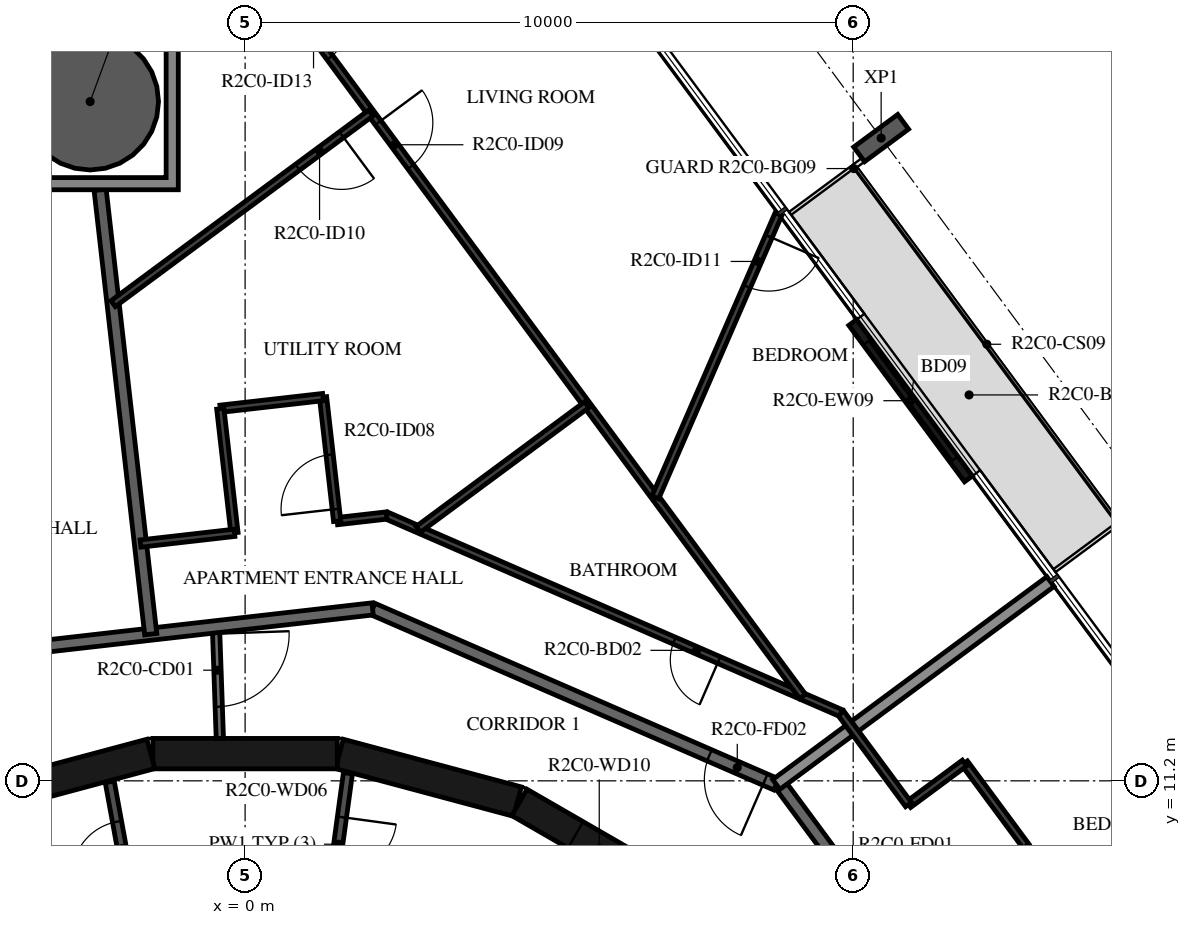
"""IFC4 building model, lengths in metres.
Left out: names, types, materials, properties, quantities, classifications, styles, units other than length and angle.
Written with IfcOpenShell. Run it as: python <this file> out.ifc"""

import sys

from ifc_helpers import new_model, si_unit, direction, frame, frame_2d, origin, origin_2d, place, context, subcontext, project, spatial, polyline, rectangle, hollow_circle, i_section, outline, extrude, element, fill, save


model = new_model("IFC4")
c1 = context("Model", 3, precision=1e-05, world=origin(), true_north=direction((0.0, 1.0)))
c2 = subcontext(c1, "Body", "Model", "MODEL_VIEW")
j1 = project(units=[si_unit("LENGTHUNIT", "METRE"), si_unit("PLANEANGLEUNIT", "RADIAN")], contexts=[c1])
p1 = place(None, origin())
s1 = spatial("IfcSite", under=j1, at=p1, CompositionType="ELEMENT")
p2 = place(p1, origin())
s2 = spatial("IfcBuilding", under=s1, at=p2, CompositionType="ELEMENT")
p3 = place(p2, frame((0.0, 0.0, 97.7)))
s3 = spatial("IfcBuildingStorey", under=s2, at=p3, CompositionType="ELEMENT", Elevation=97.7)
p4 = place(p3, frame((-2.549, 22.37, -0.38), z_axis=(0.0, 0.0, 1.0), x_axis=(1.0, 0.0, 0.0)))
e1 = element("IfcColumn", 1, at=p4, inside=s3, PredefinedType="COLUMN", context=c2, shape_type="SweptSolid", body=[
    extrude(hollow_circle(Radius=1.125, WallThickness=0.055, at=origin_2d()), origin(), (0.0, 0.0, 1.0), 3.5),
])
p5 = place(p3, frame((10.46, 21.77, -0.38), z_axis=(0.0, 0.0, 1.0), x_axis=(0.594822857897, -0.803856807972, 0.0)))
e2 = element("IfcColumn", 2, at=p5, inside=s3, PredefinedType="COLUMN", context=c2, shape_type="SweptSolid", body=[
    extrude(i_section(OverallWidth=0.3, OverallDepth=0.9, WebThickness=0.019, FlangeThickness=0.035, FilletRadius=0.03, at=origin_2d()), origin(), (0.0, 0.0, 1.0), 3.5),
])
p6 = place(p3, frame((11.895, 16.165, 0.0), z_axis=(0.0, 0.0, 1.0), x_axis=(-0.594774973163, 0.803892238611, 0.0)))
e3 = element("IfcWall", 3, at=p6, inside=s3, PredefinedType="STANDARD", context=c2, shape_type="SweptSolid", body=[
    extrude(rectangle(XDim=3.2, YDim=0.16, at=frame_2d((1.6, 0.0))), origin(), (0.0, 0.0, 1.0), 3.12),
])
p7 = place(p6, frame((0.4, 0.0, 0.0)))
e4 = element("IfcOpeningElement", 4, at=p7, cuts=e3, PredefinedType="OPENING", context=c2, shape_type="SweptSolid", body=[
    extrude(rectangle(XDim=2.4, YDim=2.4, at=frame_2d((1.2, 1.2))), frame((0.0, 0.09, 0.0), z_axis=(0.0, -1.0, 0.0), x_axis=(1.0, 0.0, 0.0)), (0.0, 0.0, 1.0), 0.18),
])
p8 = place(p3, frame((7.137, 9.329, 0.0), z_axis=(0.0, 0.0, 1.0), x_axis=(-0.865975092491, 0.500087131594, 0.0)))
e5 = element("IfcWall", 5, at=p8, inside=s3, PredefinedType="SHEAR", context=c2, shape_type="SweptSolid", body=[
    extrude(rectangle(XDim=3.033, YDim=0.5, at=frame_2d((1.516, 0.0))), origin(), (0.0, 0.0, 1.0), 3.12),
])
p9 = place(p8, frame((1.066, 0.0, 0.0)))
e6 = element("IfcOpeningElement", 6, at=p9, cuts=e5, PredefinedType="OPENING", context=c2, shape_type="SweptSolid", body=[
    extrude(rectangle(XDim=0.9, YDim=2.1, at=frame_2d((0.45, 1.05))), frame((0.0, 0.26, 0.0), z_axis=(0.0, -1.0, 0.0), x_axis=(1.0, 0.0, 0.0)), (0.0, 0.0, 1.0), 0.52),
])
for number, where, z_axis, x_axis in (
    (7, (4.479, 10.858, 0.0), (0.0, 0.0, 1.0), (-0.966, 0.259, 0.0)),
    (8, (1.516, 11.647, 0.0), (0.0, 0.0, 1.0), (-1.0, 0.0, 0.0)),
    (9, (-1.55, 11.643, 0.0), (0.0, 0.0, 1.0), (-0.966, -0.259, 0.0)),
):
    element("IfcWall", number, at=place(p3, frame(where, z_axis=z_axis, x_axis=x_axis)), inside=s3, PredefinedType="SHEAR", context=c2, shape_type="SweptSolid", body=[
        extrude(rectangle(XDim=3.033, YDim=0.5, at=frame_2d((1.516, 0.0))), origin(), (0.0, 0.0, 1.0), 3.12),
    ])
p10 = place(p3, frame((1.691, 11.326, 0.0), z_axis=(0.0, 0.0, 1.0), x_axis=(-0.135344253201, -0.990798633994, 0.0)))
e10 = element("IfcWall", 10, at=p10, inside=s3, PredefinedType="PARTITIONING", context=c2, shape_type="SweptSolid", body=[
    extrude(rectangle(XDim=2.358, YDim=0.15, at=frame_2d((1.179, 0.0))), origin(), (0.0, 0.0, 1.0), 3.12),
])
p11 = place(p10, frame((0.729, 0.0, 0.0)))
e11 = element("IfcOpeningElement", 11, at=p11, cuts=e10, PredefinedType="OPENING", context=c2, shape_type="SweptSolid", body=[
    extrude(rectangle(XDim=0.9, YDim=2.1, at=frame_2d((0.45, 1.05))), frame((0.0, 0.085, 0.0), z_axis=(0.0, -1.0, 0.0), x_axis=(1.0, 0.0, 0.0)), (0.0, 0.0, 1.0), 0.17),
])
p12 = place(p3, frame((-1.825, 8.99, 0.0), z_axis=(0.0, 0.0, 1.0), x_axis=(-0.179955206115, 0.983674805915, 0.0)))
e12 = element("IfcWall", 12, at=p12, inside=s3, PredefinedType="PARTITIONING", context=c2, shape_type="SweptSolid", body=[
    extrude(rectangle(XDim=2.229, YDim=0.15, at=frame_2d((1.115, 0.0))), origin(), (0.0, 0.0, 1.0), 3.12),
])
p13 = place(p12, frame((0.665, 0.0, 0.0)))
e13 = element("IfcOpeningElement", 13, at=p13, cuts=e12, PredefinedType="OPENING", context=c2, shape_type="SweptSolid", body=[
    extrude(rectangle(XDim=0.9, YDim=2.1, at=frame_2d((0.45, 1.05))), frame((0.0, 0.085, 0.0), z_axis=(0.0, -1.0, 0.0), x_axis=(1.0, 0.0, 0.0)), (0.0, 0.0, 1.0), 0.17),
])
p14 = place(p3, frame((-0.479, 13.734, 0.0), z_axis=(0.0, 0.0, 1.0), x_axis=(0.034805430832, -0.999394107439, 0.0)))
e14 = element("IfcWall", 14, at=p14, inside=s3, PredefinedType="PARTITIONING", context=c2, shape_type="SweptSolid", body=[
    extrude(rectangle(XDim=1.838, YDim=0.12, at=frame_2d((0.919, 0.0))), origin(), (0.0, 0.0, 1.0), 3.12),
])
p15 = place(p14, frame((0.115, 0.0, 0.0)))
e15 = element("IfcOpeningElement", 15, at=p15, cuts=e14, PredefinedType="OPENING", context=c2, shape_type="SweptSolid", body=[
    extrude(rectangle(XDim=1.2, YDim=2.1, at=frame_2d((0.6, 1.05))), frame((0.0, 0.07, 0.0), z_axis=(0.0, -1.0, 0.0), x_axis=(1.0, 0.0, 0.0)), (0.0, 0.0, 1.0), 0.14),
])
p16 = place(p3, frame((13.196, 5.198, 0.0), z_axis=(0.0, 0.0, 1.0), x_axis=(-0.594805187394, 0.803869883159, 0.0)))
e16 = element("IfcWall", 16, at=p16, inside=s3, PredefinedType="STANDARD", context=c2, shape_type="SweptSolid", body=[
    extrude(rectangle(XDim=7.342, YDim=0.2, at=frame_2d((3.671, 0.0))), origin(), (0.0, 0.0, 1.0), 3.12),
])
p17 = place(p16, frame((4.7, 0.0, 0.0)))
e17 = element("IfcOpeningElement", 17, at=p17, cuts=e16, PredefinedType="OPENING", context=c2, shape_type="SweptSolid", body=[
    extrude(rectangle(XDim=1.0, YDim=2.1, at=frame_2d((0.5, 1.05))), frame((0.0, 0.11, 0.0), z_axis=(0.0, -1.0, 0.0), x_axis=(1.0, 0.0, 0.0)), (0.0, 0.0, 1.0), 0.22),
])
p18 = place(p3, frame((8.736, 11.141, 0.0), z_axis=(0.0, 0.0, 1.0), x_axis=(-0.917051290697, 0.398769269416, 0.0)))
e18 = element("IfcWall", 18, at=p18, inside=s3, PredefinedType="STANDARD", context=c2, shape_type="SweptSolid", body=[
    extrude(rectangle(XDim=7.24, YDim=0.2, at=frame_2d((3.62, 0.0))), origin(), (0.0, 0.0, 1.0), 3.12),
])
p19 = place(p18, frame((0.2, 0.0, 0.0)))
e19 = element("IfcOpeningElement", 19, at=p19, cuts=e18, PredefinedType="OPENING", context=c2, shape_type="SweptSolid", body=[
    extrude(rectangle(XDim=1.0, YDim=2.1, at=frame_2d((0.5, 1.05))), frame((0.0, 0.11, 0.0), z_axis=(0.0, -1.0, 0.0), x_axis=(1.0, 0.0, 0.0)), (0.0, 0.0, 1.0), 0.22),
])
p20 = place(p3, frame((2.096, 14.028, 0.0), z_axis=(0.0, 0.0, 1.0), x_axis=(-0.993569170114, -0.113226782163, 0.0)))
e20 = element("IfcWall", 20, at=p20, inside=s3, PredefinedType="STANDARD", context=c2, shape_type="SweptSolid", body=[
    extrude(rectangle(XDim=7.342, YDim=0.2, at=frame_2d((3.671, 0.0))), origin(), (0.0, 0.0, 1.0), 3.12),
])
p21 = place(p3, frame((13.244, 14.477, 0.0), z_axis=(0.0, 0.0, 1.0), x_axis=(-0.803853971109, -0.594826691677, 0.0)))
e21 = element("IfcWall", 21, at=p21, inside=s3, PredefinedType="STANDARD", context=c2, shape_type="SweptSolid", body=[
    extrude(rectangle(XDim=5.609, YDim=0.2, at=frame_2d((2.804, 0.0))), origin(), (0.0, 0.0, 1.0), 2.73),
])
p22 = place(p3, frame((-2.385, 20.92, 0.0), z_axis=(0.0, 0.0, 1.0), x_axis=(0.113177776247, -0.993574753586, 0.0)))
e22 = element("IfcWall", 22, at=p22, inside=s3, PredefinedType="STANDARD", context=c2, shape_type="SweptSolid", body=[
    extrude(rectangle(XDim=7.356, YDim=0.2, at=frame_2d((3.678, 0.0))), origin(), (0.0, 0.0, 1.0), 3.12),
])
p23 = place(p3, frame((11.921, 9.444, 0.0), z_axis=(0.0, 0.0, 1.0), x_axis=(0.803768532163, 0.594942137274, 0.0)))
e23 = element("IfcWall", 23, at=p23, inside=s3, PredefinedType="PARTITIONING", context=c2, shape_type="SweptSolid", body=[
    extrude(rectangle(XDim=1.146, YDim=0.12, at=frame_2d((0.573, 0.0))), origin(), (0.0, 0.0, 1.0), 3.12),
])
p24 = place(p3, frame((12.842, 10.125, 0.0), z_axis=(0.0, 0.0, 1.0), x_axis=(-0.594770612735, 0.803895464738, 0.0)))
e24 = element("IfcWall", 24, at=p24, inside=s3, PredefinedType="PARTITIONING", context=c2, shape_type="SweptSolid", body=[
    extrude(rectangle(XDim=1.7, YDim=0.12, at=frame_2d((0.85, 0.0))), origin(), (0.0, 0.0, 1.0), 3.12),
])
p25 = place(p3, frame((11.831, 11.492, 0.0), z_axis=(0.0, 0.0, 1.0), x_axis=(-0.803843936653, -0.59484025209, 0.0)))
e25 = element("IfcWall", 25, at=p25, inside=s3, PredefinedType="PARTITIONING", context=c2, shape_type="SweptSolid", body=[
    extrude(rectangle(XDim=1.146, YDim=0.12, at=frame_2d((0.573, 0.0))), origin(), (0.0, 0.0, 1.0), 3.12),
])
p26 = place(p3, frame((10.91, 10.81, 0.0), z_axis=(0.0, 0.0, 1.0), x_axis=(-0.59489693125, 0.803801991282, 0.0)))
e26 = element("IfcWall", 26, at=p26, inside=s3, PredefinedType="PARTITIONING", context=c2, shape_type="SweptSolid", body=[
    extrude(rectangle(XDim=1.872, YDim=0.12, at=frame_2d((0.936, 0.0))), origin(), (0.0, 0.0, 1.0), 3.12),
])
p27 = place(p3, frame((9.796, 12.315, 0.0), z_axis=(0.0, 0.0, 1.0), x_axis=(-0.917059572812, 0.398750222463, 0.0)))
e27 = element("IfcWall", 27, at=p27, inside=s3, PredefinedType="PARTITIONING", context=c2, shape_type="SweptSolid", body=[
    extrude(rectangle(XDim=8.146, YDim=0.12, at=frame_2d((4.073, 0.0))), origin(), (0.0, 0.0, 1.0), 3.12),
])
p28 = place(p27, frame((2.185, 0.0, 0.0)))
e28 = element("IfcOpeningElement", 28, at=p28, cuts=e27, PredefinedType="OPENING", context=c2, shape_type="SweptSolid", body=[
    extrude(rectangle(XDim=0.8, YDim=2.1, at=frame_2d((0.4, 1.05))), frame((0.0, 0.07, 0.0), z_axis=(0.0, -1.0, 0.0), x_axis=(1.0, 0.0, 0.0)), (0.0, 0.0, 1.0), 0.14),
])
p29 = place(p3, frame((2.326, 15.563, 0.0), z_axis=(0.0, 0.0, 1.0), x_axis=(-0.993570169982, -0.113218007944, 0.0)))
e29 = element("IfcWall", 29, at=p29, inside=s3, PredefinedType="PARTITIONING", context=c2, shape_type="SweptSolid", body=[
    extrude(rectangle(XDim=0.817, YDim=0.12, at=frame_2d((0.409, 0.0))), origin(), (0.0, 0.0, 1.0), 3.12),
])
p30 = place(p3, frame((1.514, 15.471, 0.0), z_axis=(0.0, 0.0, 1.0), x_axis=(-0.113301814952, 0.993560616535, 0.0)))
e30 = element("IfcWall", 30, at=p30, inside=s3, PredefinedType="PARTITIONING", context=c2, shape_type="SweptSolid", body=[
    extrude(rectangle(XDim=2.053, YDim=0.12, at=frame_2d((1.027, 0.0))), origin(), (0.0, 0.0, 1.0), 3.12),
])
p31 = place(p30, frame((0.2, 0.0, 0.0)))
e31 = element("IfcOpeningElement", 31, at=p31, cuts=e30, PredefinedType="OPENING", context=c2, shape_type="SweptSolid", body=[
    extrude(rectangle(XDim=0.9, YDim=2.1, at=frame_2d((0.45, 1.05))), frame((0.0, 0.07, 0.0), z_axis=(0.0, -1.0, 0.0), x_axis=(1.0, 0.0, 0.0)), (0.0, 0.0, 1.0), 0.14),
])
p32 = place(p3, frame((1.281, 17.511, 0.0), z_axis=(0.0, 0.0, 1.0), x_axis=(-0.993575191649, -0.113173930474, 0.0)))
e32 = element("IfcWall", 32, at=p32, inside=s3, PredefinedType="PARTITIONING", context=c2, shape_type="SweptSolid", body=[
    extrude(rectangle(XDim=1.7, YDim=0.12, at=frame_2d((0.85, 0.0))), origin(), (0.0, 0.0, 1.0), 3.12),
])
p33 = place(p3, frame((-0.408, 17.319, 0.0), z_axis=(0.0, 0.0, 1.0), x_axis=(0.113184449176, -0.993573993452, 0.0)))
e33 = element("IfcWall", 33, at=p33, inside=s3, PredefinedType="PARTITIONING", context=c2, shape_type="SweptSolid", body=[
    extrude(rectangle(XDim=2.053, YDim=0.12, at=frame_2d((1.027, 0.0))), origin(), (0.0, 0.0, 1.0), 3.12),
])
p34 = place(p3, frame((-0.175, 15.278, 0.0), z_axis=(0.0, 0.0, 1.0), x_axis=(-0.993575604955, -0.113170301923, 0.0)))
e34 = element("IfcWall", 34, at=p34, inside=s3, PredefinedType="PARTITIONING", context=c2, shape_type="SweptSolid", body=[
    extrude(rectangle(XDim=1.555, YDim=0.12, at=frame_2d((0.778, 0.0))), origin(), (0.0, 0.0, 1.0), 3.12),
])
p35 = place(p3, frame((0.498, 24.306, 0.0), z_axis=(0.0, 0.0, 1.0), x_axis=(0.594826122019, -0.803854392639, 0.0)))
e35 = element("IfcWall", 35, at=p35, inside=s3, PredefinedType="PARTITIONING", context=c2, shape_type="SweptSolid", body=[
    extrude(rectangle(XDim=14.576, YDim=0.12, at=frame_2d((7.288, 0.0))), origin(), (0.0, 0.0, 1.0), 3.12),
])
p36 = place(p35, frame((2.841, 0.0, 0.0)))
e36 = element("IfcOpeningElement", 36, at=p36, cuts=e35, PredefinedType="OPENING", context=c2, shape_type="SweptSolid", body=[
    extrude(rectangle(XDim=0.9, YDim=2.1, at=frame_2d((0.45, 1.05))), frame((0.0, 0.07, 0.0), z_axis=(0.0, -1.0, 0.0), x_axis=(1.0, 0.0, 0.0)), (0.0, 0.0, 1.0), 0.14),
])
p37 = place(p35, frame((0.605, 0.0, 0.0)))
e37 = element("IfcOpeningElement", 37, at=p37, cuts=e35, PredefinedType="OPENING", context=c2, shape_type="SweptSolid", body=[
    extrude(rectangle(XDim=0.9, YDim=2.1, at=frame_2d((0.45, 1.05))), frame((0.0, 0.07, 0.0), z_axis=(0.0, -1.0, 0.0), x_axis=(1.0, 0.0, 0.0)), (0.0, 0.0, 1.0), 0.14),
])
p38 = place(p3, frame((8.772, 20.521, 0.0), z_axis=(0.0, 0.0, 1.0), x_axis=(-0.398733139635, -0.917067000473, 0.0)))
e38 = element("IfcWall", 38, at=p38, inside=s3, PredefinedType="PARTITIONING", context=c2, shape_type="SweptSolid", body=[
    extrude(rectangle(XDim=5.081, YDim=0.12, at=frame_2d((2.541, 0.0))), origin(), (0.0, 0.0, 1.0), 3.12),
])
p39 = place(p38, frame((0.4, 0.0, 0.0)))
e39 = element("IfcOpeningElement", 39, at=p39, cuts=e38, PredefinedType="OPENING", context=c2, shape_type="SweptSolid", body=[
    extrude(rectangle(XDim=0.9, YDim=2.1, at=frame_2d((0.45, 1.05))), frame((0.0, 0.07, 0.0), z_axis=(0.0, -1.0, 0.0), x_axis=(1.0, 0.0, 0.0)), (0.0, 0.0, 1.0), 0.14),
])
p40 = place(p3, frame((5.618, 17.386, 0.0), z_axis=(0.0, 0.0, 1.0), x_axis=(-0.803852063114, -0.59482927015, 0.0)))
e40 = element("IfcWall", 40, at=p40, inside=s3, PredefinedType="PARTITIONING", context=c2, shape_type="SweptSolid", body=[
    extrude(rectangle(XDim=3.446, YDim=0.12, at=frame_2d((1.723, 0.0))), origin(), (0.0, 0.0, 1.0), 3.12),
])
p41 = place(p3, frame((2.068, 22.183, 0.0), z_axis=(0.0, 0.0, 1.0), x_axis=(-0.803867138365, -0.594808896921, 0.0)))
e41 = element("IfcWall", 41, at=p41, inside=s3, PredefinedType="PARTITIONING", context=c2, shape_type="SweptSolid", body=[
    extrude(rectangle(XDim=5.273, YDim=0.12, at=frame_2d((2.636, 0.0))), origin(), (0.0, 0.0, 1.0), 3.12),
])
p42 = place(p41, frame((0.6, 0.0, 0.0)))
e42 = element("IfcOpeningElement", 42, at=p42, cuts=e41, PredefinedType="OPENING", context=c2, shape_type="SweptSolid", body=[
    extrude(rectangle(XDim=0.9, YDim=2.1, at=frame_2d((0.45, 1.05))), frame((0.0, 0.07, 0.0), z_axis=(0.0, -1.0, 0.0), x_axis=(1.0, 0.0, 0.0)), (0.0, 0.0, 1.0), 0.14),
])
p43 = place(p3, origin())
e43 = element("IfcWall", 43, at=p43, inside=s3, PredefinedType="STANDARD", context=c2, shape_type="SweptSolid", body=[
    extrude(outline(polyline([(-1.099, 23.82), (-1.099, 20.92), (-3.999, 20.92), (-3.999, 23.82), (-1.099, 23.82)]), holes=[polyline([(-3.799, 21.12), (-1.299, 21.12), (-1.299, 23.62), (-3.799, 23.62), (-3.799, 21.12)])]), origin(), (0.0, 0.0, 1.0), 3.12),
])
p44 = place(p7, origin())
e44 = element("IfcDoor", 44, at=p44, inside=s3, OperationType="DOUBLE_DOOR_SLIDING", PredefinedType="DOOR", context=c2, shape_type="SweptSolid", body=[
    extrude(rectangle(XDim=2.4, YDim=2.4, at=frame_2d((1.2, 1.2))), frame((0.0, 0.025, 0.0), z_axis=(0.0, -1.0, 0.0), x_axis=(1.0, 0.0, 0.0)), (0.0, 0.0, 1.0), 0.05),
])
fill(e4, e44)
p45 = place(p11, origin())
e45 = element("IfcDoor", 45, at=p45, inside=s3, OperationType="SINGLE_SWING_LEFT", PredefinedType="DOOR", context=c2, shape_type="SweptSolid", body=[
    extrude(rectangle(XDim=0.9, YDim=2.1, at=frame_2d((0.45, 1.05))), frame((0.0, 0.025, 0.0), z_axis=(0.0, -1.0, 0.0), x_axis=(1.0, 0.0, 0.0)), (0.0, 0.0, 1.0), 0.05),
])
fill(e11, e45)
p46 = place(p13, origin())
e46 = element("IfcDoor", 46, at=p46, inside=s3, OperationType="SINGLE_SWING_RIGHT", PredefinedType="DOOR", context=c2, shape_type="SweptSolid", body=[
    extrude(rectangle(XDim=0.9, YDim=2.1, at=frame_2d((0.45, 1.05))), frame((0.0, 0.025, 0.0), z_axis=(0.0, -1.0, 0.0), x_axis=(1.0, 0.0, 0.0)), (0.0, 0.0, 1.0), 0.05),
])
fill(e13, e46)
p47 = place(p9, origin())
e47 = element("IfcDoor", 47, at=p47, inside=s3, OperationType="SINGLE_SWING_LEFT", PredefinedType="DOOR", context=c2, shape_type="SweptSolid", body=[
    extrude(rectangle(XDim=0.9, YDim=2.1, at=frame_2d((0.45, 1.05))), frame((0.0, 0.025, 0.0), z_axis=(0.0, -1.0, 0.0), x_axis=(1.0, 0.0, 0.0)), (0.0, 0.0, 1.0), 0.05),
])
fill(e6, e47)
p48 = place(p19, origin())
e48 = element("IfcDoor", 48, at=p48, inside=s3, OperationType="SINGLE_SWING_RIGHT", PredefinedType="DOOR", context=c2, shape_type="SweptSolid", body=[
    extrude(rectangle(XDim=1.0, YDim=2.1, at=frame_2d((0.5, 1.05))), frame((0.0, 0.025, 0.0), z_axis=(0.0, -1.0, 0.0), x_axis=(1.0, 0.0, 0.0)), (0.0, 0.0, 1.0), 0.05),
])
fill(e19, e48)
p49 = place(p28, origin())
e49 = element("IfcDoor", 49, at=p49, inside=s3, OperationType="SINGLE_SWING_RIGHT", PredefinedType="DOOR", context=c2, shape_type="SweptSolid", body=[
    extrude(rectangle(XDim=0.8, YDim=2.1, at=frame_2d((0.4, 1.05))), frame((0.0, 0.025, 0.0), z_axis=(0.0, -1.0, 0.0), x_axis=(1.0, 0.0, 0.0)), (0.0, 0.0, 1.0), 0.05),
])
fill(e28, e49)
p50 = place(p31, origin())
e50 = element("IfcDoor", 50, at=p50, inside=s3, OperationType="SINGLE_SWING_RIGHT", PredefinedType="DOOR", context=c2, shape_type="SweptSolid", body=[
    extrude(rectangle(XDim=0.9, YDim=2.1, at=frame_2d((0.45, 1.05))), frame((0.0, 0.025, 0.0), z_axis=(0.0, -1.0, 0.0), x_axis=(1.0, 0.0, 0.0)), (0.0, 0.0, 1.0), 0.05),
])
fill(e31, e50)
p51 = place(p36, origin())
e51 = element("IfcDoor", 51, at=p51, inside=s3, OperationType="SINGLE_SWING_RIGHT", PredefinedType="DOOR", context=c2, shape_type="SweptSolid", body=[
    extrude(rectangle(XDim=0.9, YDim=2.1, at=frame_2d((0.45, 1.05))), frame((0.0, 0.025, 0.0), z_axis=(0.0, -1.0, 0.0), x_axis=(1.0, 0.0, 0.0)), (0.0, 0.0, 1.0), 0.05),
])
fill(e36, e51)
p52 = place(p42, origin())
e52 = element("IfcDoor", 52, at=p52, inside=s3, OperationType="SINGLE_SWING_RIGHT", PredefinedType="DOOR", context=c2, shape_type="SweptSolid", body=[
    extrude(rectangle(XDim=0.9, YDim=2.1, at=frame_2d((0.45, 1.05))), frame((0.0, 0.025, 0.0), z_axis=(0.0, -1.0, 0.0), x_axis=(1.0, 0.0, 0.0)), (0.0, 0.0, 1.0), 0.05),
])
fill(e42, e52)
p53 = place(p39, origin())
e53 = element("IfcDoor", 53, at=p53, inside=s3, OperationType="SINGLE_SWING_LEFT", PredefinedType="DOOR", context=c2, shape_type="SweptSolid", body=[
    extrude(rectangle(XDim=0.9, YDim=2.1, at=frame_2d((0.45, 1.05))), frame((0.0, 0.025, 0.0), z_axis=(0.0, -1.0, 0.0), x_axis=(1.0, 0.0, 0.0)), (0.0, 0.0, 1.0), 0.05),
])
fill(e39, e53)
p54 = place(p37, origin())
e54 = element("IfcDoor", 54, at=p54, inside=s3, OperationType="SINGLE_SWING_LEFT", PredefinedType="DOOR", context=c2, shape_type="SweptSolid", body=[
    extrude(rectangle(XDim=0.9, YDim=2.1, at=frame_2d((0.45, 1.05))), frame((0.0, 0.025, 0.0), z_axis=(0.0, -1.0, 0.0), x_axis=(1.0, 0.0, 0.0)), (0.0, 0.0, 1.0), 0.05),
])
fill(e37, e54)
p55 = place(p15, origin())
e55 = element("IfcDoor", 55, at=p55, inside=s3, OperationType="DOUBLE_DOOR_SINGLE_SWING", PredefinedType="DOOR", context=c2, shape_type="SweptSolid", body=[
    extrude(rectangle(XDim=1.2, YDim=2.1, at=frame_2d((0.6, 1.05))), frame((0.0, 0.025, 0.0), z_axis=(0.0, -1.0, 0.0), x_axis=(1.0, 0.0, 0.0)), (0.0, 0.0, 1.0), 0.05),
])
fill(e15, e55)
save(model, sys.argv[1])
